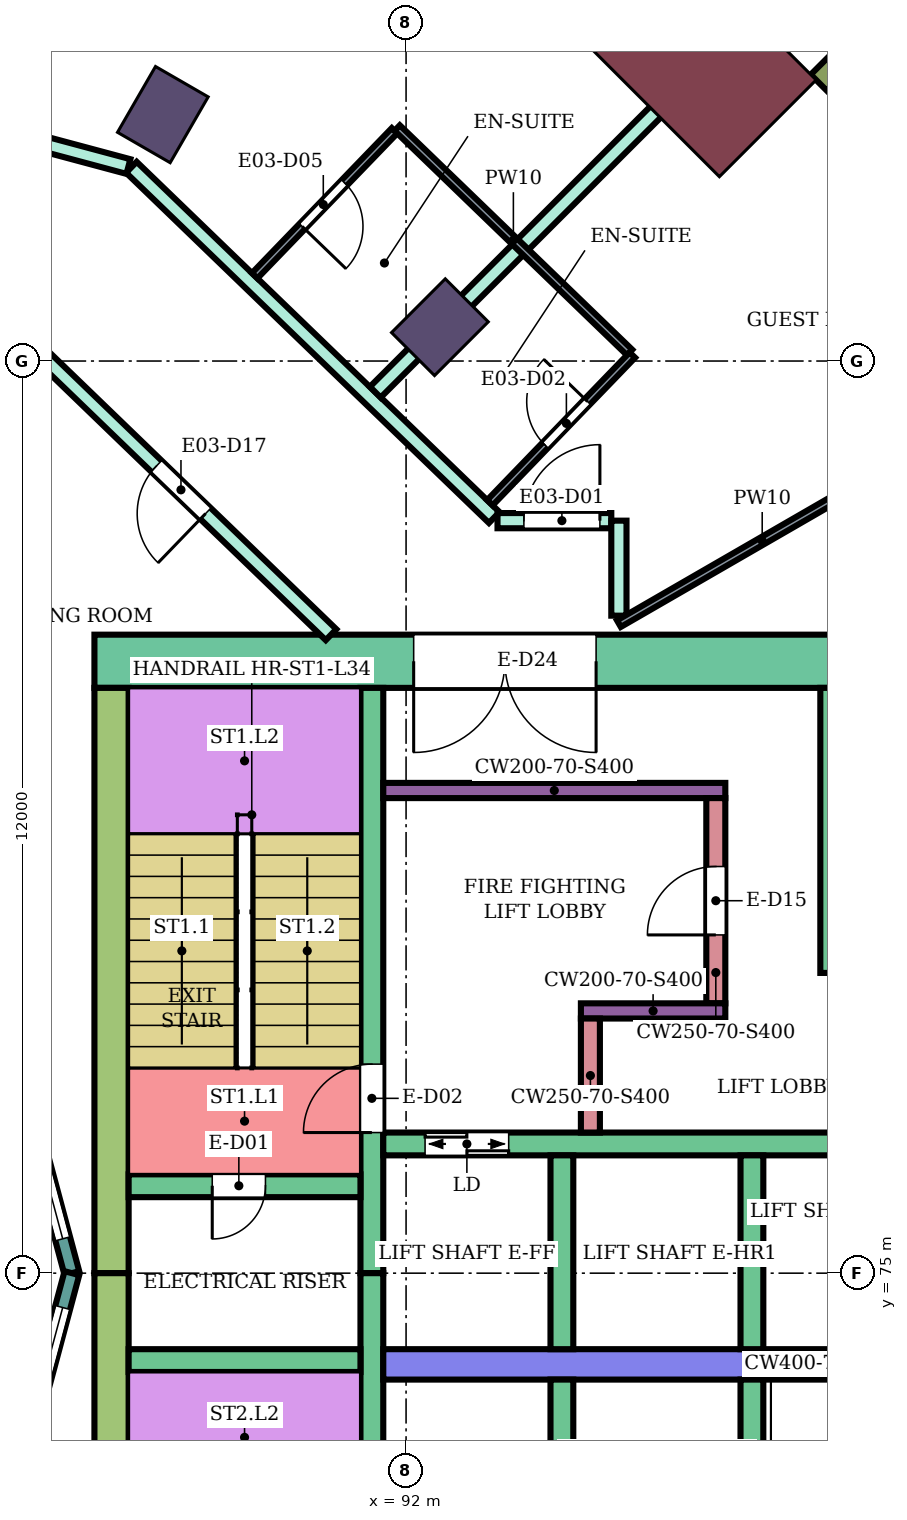
"""IFC4 building model, lengths in metres.
Left out: names, types, materials, properties, quantities, classifications, styles, units other than length and angle.
Written with IfcOpenShell. Run it as: python <this file> out.ifc"""

import sys

from ifc_helpers import new_model, si_unit, direction, frame, frame_2d, origin, origin_2d, place, context, subcontext, project, spatial, rectangle, extrude, element, fill, save


model = new_model("IFC4")
c1 = context("Model", 3, precision=1e-05, world=origin(), true_north=direction((0.0, 1.0)))
c2 = subcontext(c1, "Body", "Model", "MODEL_VIEW")
j1 = project(units=[si_unit("LENGTHUNIT", "METRE"), si_unit("PLANEANGLEUNIT", "RADIAN")], contexts=[c1])
p1 = place(None, origin())
s1 = spatial("IfcSite", under=j1, at=p1, CompositionType="ELEMENT")
p2 = place(p1, origin())
s2 = spatial("IfcBuilding", under=s1, at=p2, CompositionType="ELEMENT")
p3 = place(p2, frame((0.0, 0.0, 145.8)))
s3 = spatial("IfcBuildingStorey", under=s2, at=p3, CompositionType="ELEMENT", Elevation=145.8)
for number, where, z_axis, x_axis in (
    (1, (92.445, 87.445, 0.0), (0.0, 0.0, 1.0), (0.707, 0.707, 0.0)),
    (2, (88.8, 90.242, 0.0), (0.0, 0.0, 1.0), (0.5, 0.866, 0.0)),
):
    element("IfcColumn", number, at=place(p3, frame(where, z_axis=z_axis, x_axis=x_axis)), inside=s3, PredefinedType="COLUMN", context=c2, shape_type="SweptSolid", body=[
        extrude(rectangle(XDim=1.0, YDim=0.8, at=origin_2d()), origin(), (0.0, 0.0, 1.0), 3.9),
    ])
p4 = place(p3, frame((95.91, 90.91, 0.0), z_axis=(0.0, 0.0, 1.0), x_axis=(0.707106781187, 0.707106781187, 0.0)))
e3 = element("IfcColumn", 3, at=p4, inside=s3, PredefinedType="COLUMN", context=c2, shape_type="SweptSolid", body=[
    extrude(rectangle(XDim=1.8, YDim=2.4, at=origin_2d()), origin(), (0.0, 0.0, 1.0), 3.9),
])
p5 = place(p3, frame((87.9, 83.05, 0.0), z_axis=(0.0, 0.0, 1.0), x_axis=(1.0, 0.0, 0.0)))
e4 = element("IfcWall", 4, at=p5, inside=s3, PredefinedType="SHEAR", context=c2, shape_type="SweptSolid", body=[
    extrude(rectangle(XDim=14.8, YDim=0.7, at=frame_2d((7.4, 0.0))), origin(), (0.0, 0.0, 1.0), 3.5),
])
p6 = place(p5, frame((4.2, 0.0, 0.0)))
e5 = element("IfcOpeningElement", 5, at=p6, cuts=e4, PredefinedType="OPENING", context=c2, shape_type="SweptSolid", body=[
    extrude(rectangle(XDim=2.4, YDim=2.4, at=frame_2d((1.2, 1.2))), frame((0.0, 0.36, 0.0), z_axis=(0.0, -1.0, 0.0), x_axis=(1.0, 0.0, 0.0)), (0.0, 0.0, 1.0), 0.72),
])
for number, where, z_axis, x_axis in (
    (6, (88.125, 75.0, 0.0), (0.0, 0.0, 1.0), (0.0, 1.0, 0.0)),
    (7, (88.125, 67.3, 0.0), (0.0, 0.0, 1.0), (0.0, 1.0, 0.0)),
):
    element("IfcWall", number, at=place(p3, frame(where, z_axis=z_axis, x_axis=x_axis)), inside=s3, PredefinedType="SHEAR", context=c2, shape_type="SweptSolid", body=[
        extrude(rectangle(XDim=7.7, YDim=0.45, at=frame_2d((3.85, 0.0))), origin(), (0.0, 0.0, 1.0), 3.5),
    ])
p7 = place(p3, frame((91.55, 75.0, 0.0), z_axis=(0.0, 0.0, 1.0), x_axis=(0.0, 1.0, 0.0)))
e8 = element("IfcWall", 8, at=p7, inside=s3, PredefinedType="SHEAR", context=c2, shape_type="SweptSolid", body=[
    extrude(rectangle(XDim=7.7, YDim=0.3, at=frame_2d((3.85, 0.0))), origin(), (0.0, 0.0, 1.0), 3.5),
])
p8 = place(p7, frame((1.85, 0.0, 0.0)))
e9 = element("IfcOpeningElement", 9, at=p8, cuts=e8, PredefinedType="OPENING", context=c2, shape_type="SweptSolid", body=[
    extrude(rectangle(XDim=0.9, YDim=2.1, at=frame_2d((0.45, 1.05))), frame((0.0, 0.16, 0.0), z_axis=(0.0, -1.0, 0.0), x_axis=(1.0, 0.0, 0.0)), (0.0, 0.0, 1.0), 0.32),
])
p9 = place(p3, frame((91.55, 67.3, 0.0), z_axis=(0.0, 0.0, 1.0), x_axis=(0.0, 1.0, 0.0)))
e10 = element("IfcWall", 10, at=p9, inside=s3, PredefinedType="SHEAR", context=c2, shape_type="SweptSolid", body=[
    extrude(rectangle(XDim=7.7, YDim=0.3, at=frame_2d((3.85, 0.0))), origin(), (0.0, 0.0, 1.0), 3.5),
])
p10 = place(p9, frame((0.35, 0.0, 0.0)))
e11 = element("IfcOpeningElement", 11, at=p10, cuts=e10, PredefinedType="OPENING", context=c2, shape_type="SweptSolid", body=[
    extrude(rectangle(XDim=0.9, YDim=2.1, at=frame_2d((0.45, 1.05))), frame((0.0, 0.16, 0.0), z_axis=(0.0, -1.0, 0.0), x_axis=(1.0, 0.0, 0.0)), (0.0, 0.0, 1.0), 0.32),
])
p11 = place(p3, frame((88.35, 76.15, 0.0), z_axis=(0.0, 0.0, 1.0), x_axis=(1.0, 0.0, 0.0)))
e12 = element("IfcWall", 12, at=p11, inside=s3, PredefinedType="SHEAR", context=c2, shape_type="SweptSolid", body=[
    extrude(rectangle(XDim=3.05, YDim=0.3, at=frame_2d((1.525, 0.0))), origin(), (0.0, 0.0, 1.0), 3.5),
])
p12 = place(p11, frame((1.1, 0.0, 0.0)))
e13 = element("IfcOpeningElement", 13, at=p12, cuts=e12, PredefinedType="OPENING", context=c2, shape_type="SweptSolid", body=[
    extrude(rectangle(XDim=0.7, YDim=2.0, at=frame_2d((0.35, 1.0))), frame((0.0, 0.16, 0.0), z_axis=(0.0, -1.0, 0.0), x_axis=(1.0, 0.0, 0.0)), (0.0, 0.0, 1.0), 0.32),
])
p13 = place(p3, frame((88.35, 73.85, 0.0), z_axis=(0.0, 0.0, 1.0), x_axis=(1.0, 0.0, 0.0)))
e14 = element("IfcWall", 14, at=p13, inside=s3, PredefinedType="SHEAR", context=c2, shape_type="SweptSolid", body=[
    extrude(rectangle(XDim=3.05, YDim=0.3, at=frame_2d((1.525, 0.0))), origin(), (0.0, 0.0, 1.0), 3.5),
])
p14 = place(p3, frame((91.7, 76.7, 0.0), z_axis=(0.0, 0.0, 1.0), x_axis=(1.0, 0.0, 0.0)))
e15 = element("IfcWall", 15, at=p14, inside=s3, PredefinedType="SHEAR", context=c2, shape_type="SweptSolid", body=[
    extrude(rectangle(XDim=11.0, YDim=0.3, at=frame_2d((5.5, 0.0))), origin(), (0.0, 0.0, 1.0), 3.5),
])
p15 = place(p14, frame((0.55, 0.0, 0.0)))
e16 = element("IfcOpeningElement", 16, at=p15, cuts=e15, PredefinedType="OPENING", context=c2, shape_type="SweptSolid", body=[
    extrude(rectangle(XDim=1.1, YDim=2.1, at=frame_2d((0.55, 1.05))), frame((0.0, 0.16, 0.0), z_axis=(0.0, -1.0, 0.0), x_axis=(1.0, 0.0, 0.0)), (0.0, 0.0, 1.0), 0.32),
])
p16 = place(p14, frame((8.1, 0.0, 0.0)))
e17 = element("IfcOpeningElement", 17, at=p16, cuts=e15, PredefinedType="OPENING", context=c2, shape_type="SweptSolid", body=[
    extrude(rectangle(XDim=1.0, YDim=2.1, at=frame_2d((0.5, 1.05))), frame((0.0, 0.16, 0.0), z_axis=(0.0, -1.0, 0.0), x_axis=(1.0, 0.0, 0.0)), (0.0, 0.0, 1.0), 0.32),
])
p17 = place(p3, frame((91.7, 73.8, 0.0), z_axis=(0.0, 0.0, 1.0), x_axis=(1.0, 0.0, 0.0)))
e18 = element("IfcWall", 18, at=p17, inside=s3, PredefinedType="SHEAR", context=c2, shape_type="SweptSolid", body=[
    extrude(rectangle(XDim=11.0, YDim=0.4, at=frame_2d((5.5, 0.0))), origin(), (0.0, 0.0, 1.0), 3.5),
])
for number, where, z_axis, x_axis in (
    (19, (94.05, 74.0, 0.0), (0.0, 0.0, 1.0), (0.0, 1.0, 0.0)),
    (20, (96.55, 74.0, 0.0), (0.0, 0.0, 1.0), (0.0, 1.0, 0.0)),
    (21, (94.05, 71.05, 0.0), (0.0, 0.0, 1.0), (0.0, 1.0, 0.0)),
    (22, (96.55, 71.05, 0.0), (0.0, 0.0, 1.0), (0.0, 1.0, 0.0)),
):
    element("IfcWall", number, at=place(p3, frame(where, z_axis=z_axis, x_axis=x_axis)), inside=s3, PredefinedType="SHEAR", context=c2, shape_type="SweptSolid", body=[
        extrude(rectangle(XDim=2.55, YDim=0.3, at=frame_2d((1.275, 0.0))), origin(), (0.0, 0.0, 1.0), 3.5),
    ])
p18 = place(p3, frame((91.7, 81.35, 0.0), z_axis=(0.0, 0.0, 1.0), x_axis=(1.0, 0.0, 0.0)))
e23 = element("IfcWall", 23, at=p18, inside=s3, PredefinedType="SHEAR", context=c2, shape_type="SweptSolid", body=[
    extrude(rectangle(XDim=4.5, YDim=0.2, at=frame_2d((2.25, 0.0))), origin(), (0.0, 0.0, 1.0), 3.5),
])
p19 = place(p3, frame((96.075, 78.55, 0.0), z_axis=(0.0, 0.0, 1.0), x_axis=(0.0, 1.0, 0.0)))
e24 = element("IfcWall", 24, at=p19, inside=s3, PredefinedType="SHEAR", context=c2, shape_type="SweptSolid", body=[
    extrude(rectangle(XDim=2.7, YDim=0.25, at=frame_2d((1.35, 0.0))), origin(), (0.0, 0.0, 1.0), 3.5),
])
p20 = place(p19, frame((0.9, 0.0, 0.0)))
e25 = element("IfcOpeningElement", 25, at=p20, cuts=e24, PredefinedType="OPENING", context=c2, shape_type="SweptSolid", body=[
    extrude(rectangle(XDim=0.9, YDim=2.1, at=frame_2d((0.45, 1.05))), frame((0.0, 0.135, 0.0), z_axis=(0.0, -1.0, 0.0), x_axis=(1.0, 0.0, 0.0)), (0.0, 0.0, 1.0), 0.27),
])
p21 = place(p3, frame((94.3, 78.45, 0.0), z_axis=(0.0, 0.0, 1.0), x_axis=(1.0, 0.0, 0.0)))
e26 = element("IfcWall", 26, at=p21, inside=s3, PredefinedType="SHEAR", context=c2, shape_type="SweptSolid", body=[
    extrude(rectangle(XDim=1.9, YDim=0.2, at=frame_2d((0.95, 0.0))), origin(), (0.0, 0.0, 1.0), 3.5),
])
p22 = place(p3, frame((94.425, 76.85, 0.0), z_axis=(0.0, 0.0, 1.0), x_axis=(0.0, 1.0, 0.0)))
e27 = element("IfcWall", 27, at=p22, inside=s3, PredefinedType="SHEAR", context=c2, shape_type="SweptSolid", body=[
    extrude(rectangle(XDim=1.5, YDim=0.25, at=frame_2d((0.75, 0.0))), origin(), (0.0, 0.0, 1.0), 3.5),
])
p23 = place(p3, frame((97.6, 78.95, 0.0), z_axis=(0.0, 0.0, 1.0), x_axis=(0.0, 1.0, 0.0)))
e28 = element("IfcWall", 28, at=p23, inside=s3, PredefinedType="SHEAR", context=c2, shape_type="SweptSolid", body=[
    extrude(rectangle(XDim=3.75, YDim=0.3, at=frame_2d((1.875, 0.0))), origin(), (0.0, 0.0, 1.0), 3.5),
])
p24 = place(p3, frame((97.43, 90.662, 0.0), z_axis=(0.0, 0.0, 1.0), x_axis=(0.707106781187, 0.707106781187, 0.0)))
e29 = element("IfcWall", 29, at=p24, inside=s3, PredefinedType="NOTDEFINED", context=c2, shape_type="SweptSolid", body=[
    extrude(rectangle(XDim=2.416, YDim=0.3, at=frame_2d((1.208, 0.0))), origin(), (0.0, 0.0, 1.0), 3.9),
])
p25 = place(p3, frame((87.604, 75.0, 0.0), z_axis=(0.0, 0.0, 1.0), x_axis=(-0.258789828301, 0.965933654434, 0.0)))
e30 = element("IfcWall", 30, at=p25, inside=s3, PredefinedType="NOTDEFINED", context=c2, shape_type="SweptSolid", body=[
    extrude(rectangle(XDim=3.936, YDim=0.2, at=frame_2d((1.968, 0.0))), origin(), (0.0, 0.0, 1.0), 3.9),
])
p26 = place(p25, frame((0.468, 0.0, 0.9)))
e31 = element("IfcOpeningElement", 31, at=p26, cuts=e30, PredefinedType="OPENING", context=c2, shape_type="SweptSolid", body=[
    extrude(rectangle(XDim=3.0, YDim=2.3, at=frame_2d((1.5, 1.15))), frame((0.0, 0.11, 0.0), z_axis=(0.0, -1.0, 0.0), x_axis=(1.0, 0.0, 0.0)), (0.0, 0.0, 1.0), 0.22),
])
p27 = place(p3, frame((86.585, 71.198, 0.0), z_axis=(0.0, 0.0, 1.0), x_axis=(0.258789828301, 0.965933654434, 0.0)))
e32 = element("IfcWall", 32, at=p27, inside=s3, PredefinedType="NOTDEFINED", context=c2, shape_type="SweptSolid", body=[
    extrude(rectangle(XDim=3.936, YDim=0.2, at=frame_2d((1.968, 0.0))), origin(), (0.0, 0.0, 1.0), 3.9),
])
p28 = place(p27, frame((0.468, 0.0, 0.9)))
e33 = element("IfcOpeningElement", 33, at=p28, cuts=e32, PredefinedType="OPENING", context=c2, shape_type="SweptSolid", body=[
    extrude(rectangle(XDim=3.0, YDim=2.3, at=frame_2d((1.5, 1.15))), frame((0.0, 0.11, 0.0), z_axis=(0.0, -1.0, 0.0), x_axis=(1.0, 0.0, 0.0)), (0.0, 0.0, 1.0), 0.22),
])
p29 = place(p3, frame((80.0, 91.796, 0.0), z_axis=(0.0, 0.0, 1.0), x_axis=(0.965891796243, -0.258946013582, 0.0)))
e34 = element("IfcWall", 34, at=p29, inside=s3, PredefinedType="PARTITIONING", context=c2, shape_type="SweptSolid", body=[
    extrude(rectangle(XDim=8.642, YDim=0.2, at=frame_2d((4.321, 0.0))), origin(), (0.0, 0.0, 1.0), 3.45),
])
p30 = place(p29, frame((4.877, 0.0, 0.0)))
e35 = element("IfcOpeningElement", 35, at=p30, cuts=e34, PredefinedType="OPENING", context=c2, shape_type="SweptSolid", body=[
    extrude(rectangle(XDim=1.0, YDim=2.1, at=frame_2d((0.5, 1.05))), frame((0.0, 0.11, 0.0), z_axis=(0.0, -1.0, 0.0), x_axis=(1.0, 0.0, 0.0)), (0.0, 0.0, 1.0), 0.22),
])
p31 = place(p29, frame((2.817, 0.0, 0.0)))
e36 = element("IfcOpeningElement", 36, at=p31, cuts=e34, PredefinedType="OPENING", context=c2, shape_type="SweptSolid", body=[
    extrude(rectangle(XDim=1.0, YDim=2.1, at=frame_2d((0.5, 1.05))), frame((0.0, 0.11, 0.0), z_axis=(0.0, -1.0, 0.0), x_axis=(1.0, 0.0, 0.0)), (0.0, 0.0, 1.0), 0.22),
])
p32 = place(p3, frame((87.064, 87.211, 0.0), z_axis=(0.0, 0.0, 1.0), x_axis=(0.719562412484, -0.694427774891, 0.0)))
e37 = element("IfcWall", 37, at=p32, inside=s3, PredefinedType="PARTITIONING", context=c2, shape_type="SweptSolid", body=[
    extrude(rectangle(XDim=5.488, YDim=0.2, at=frame_2d((2.744, 0.0))), origin(), (0.0, 0.0, 1.0), 3.45),
])
p33 = place(p32, frame((2.294, 0.0, 0.0)))
e38 = element("IfcOpeningElement", 38, at=p33, cuts=e37, PredefinedType="OPENING", context=c2, shape_type="SweptSolid", body=[
    extrude(rectangle(XDim=0.9, YDim=2.1, at=frame_2d((0.45, 1.05))), frame((0.0, 0.11, 0.0), z_axis=(0.0, -1.0, 0.0), x_axis=(1.0, 0.0, 0.0)), (0.0, 0.0, 1.0), 0.22),
])
p34 = place(p3, frame((88.386, 89.549, 0.0), z_axis=(0.0, 0.0, 1.0), x_axis=(0.719507339337, -0.694484836869, 0.0)))
e39 = element("IfcWall", 39, at=p34, inside=s3, PredefinedType="PARTITIONING", context=c2, shape_type="SweptSolid", body=[
    extrude(rectangle(XDim=6.635, YDim=0.2, at=frame_2d((3.317, 0.0))), origin(), (0.0, 0.0, 1.0), 3.45),
])
p35 = place(p3, frame((91.595, 86.591, 0.0), z_axis=(0.0, 0.0, 1.0), x_axis=(0.707214399597, 0.706999146394, 0.0)))
e40 = element("IfcWall", 40, at=p35, inside=s3, PredefinedType="PARTITIONING", context=c2, shape_type="SweptSolid", body=[
    extrude(rectangle(XDim=6.805, YDim=0.2, at=frame_2d((3.403, 0.0))), origin(), (0.0, 0.0, 1.0), 3.45),
])
p36 = place(p3, frame((93.203, 84.9, 0.0), z_axis=(0.0, 0.0, 1.0), x_axis=(1.0, 0.0, 0.0)))
e41 = element("IfcWall", 41, at=p36, inside=s3, PredefinedType="PARTITIONING", context=c2, shape_type="SweptSolid", body=[
    extrude(rectangle(XDim=1.497, YDim=0.2, at=frame_2d((0.749, 0.0))), origin(), (0.0, 0.0, 1.0), 3.45),
])
p37 = place(p36, frame((0.347, 0.0, 0.0)))
e42 = element("IfcOpeningElement", 42, at=p37, cuts=e41, PredefinedType="OPENING", context=c2, shape_type="SweptSolid", body=[
    extrude(rectangle(XDim=1.0, YDim=2.1, at=frame_2d((0.5, 1.05))), frame((0.0, 0.11, 0.0), z_axis=(0.0, -1.0, 0.0), x_axis=(1.0, 0.0, 0.0)), (0.0, 0.0, 1.0), 0.22),
])
p38 = place(p3, frame((94.8, 83.65, 0.0), z_axis=(0.0, 0.0, 1.0), x_axis=(0.0, 1.0, 0.0)))
e43 = element("IfcWall", 43, at=p38, inside=s3, PredefinedType="PARTITIONING", context=c2, shape_type="SweptSolid", body=[
    extrude(rectangle(XDim=1.25, YDim=0.2, at=frame_2d((0.625, 0.0))), origin(), (0.0, 0.0, 1.0), 3.45),
])
p39 = place(p3, frame((90.008, 88.123, 0.0), z_axis=(0.0, 0.0, 1.0), x_axis=(0.694372521817, 0.719615731447, 0.0)))
e44 = element("IfcWall", 44, at=p39, inside=s3, PredefinedType="PARTITIONING", context=c2, shape_type="SweptSolid", body=[
    extrude(rectangle(XDim=2.65, YDim=0.1, at=frame_2d((1.325, 0.0))), origin(), (0.0, 0.0, 1.0), 3.45),
])
p40 = place(p39, frame((0.9, 0.0, 0.0)))
e45 = element("IfcOpeningElement", 45, at=p40, cuts=e44, PredefinedType="OPENING", context=c2, shape_type="SweptSolid", body=[
    extrude(rectangle(XDim=0.8, YDim=2.1, at=frame_2d((0.4, 1.05))), frame((0.0, 0.06, 0.0), z_axis=(0.0, -1.0, 0.0), x_axis=(1.0, 0.0, 0.0)), (0.0, 0.0, 1.0), 0.12),
])
p41 = place(p3, frame((91.883, 90.066, 0.0), z_axis=(0.0, 0.0, 1.0), x_axis=(0.719460839421, -0.694533008963, 0.0)))
e46 = element("IfcWall", 46, at=p41, inside=s3, PredefinedType="PARTITIONING", context=c2, shape_type="SweptSolid", body=[
    extrude(rectangle(XDim=4.25, YDim=0.1, at=frame_2d((2.125, 0.0))), origin(), (0.0, 0.0, 1.0), 3.45),
])
p42 = place(p3, frame((93.103, 85.136, 0.0), z_axis=(0.0, 0.0, 1.0), x_axis=(0.694287838235, 0.719697434815, 0.0)))
e47 = element("IfcWall", 47, at=p42, inside=s3, PredefinedType="PARTITIONING", context=c2, shape_type="SweptSolid", body=[
    extrude(rectangle(XDim=2.7, YDim=0.1, at=frame_2d((1.35, 0.0))), origin(), (0.0, 0.0, 1.0), 3.45),
])
p43 = place(p42, frame((1.05, 0.0, 0.0)))
e48 = element("IfcOpeningElement", 48, at=p43, cuts=e47, PredefinedType="OPENING", context=c2, shape_type="SweptSolid", body=[
    extrude(rectangle(XDim=0.8, YDim=2.1, at=frame_2d((0.4, 1.05))), frame((0.0, 0.06, 0.0), z_axis=(0.0, -1.0, 0.0), x_axis=(1.0, 0.0, 0.0)), (0.0, 0.0, 1.0), 0.12),
])
p44 = place(p3, frame((94.8, 83.545, 0.0), z_axis=(0.0, 0.0, 1.0), x_axis=(0.86602264145, 0.500004784474, 0.0)))
e49 = element("IfcWall", 49, at=p44, inside=s3, PredefinedType="PARTITIONING", context=c2, shape_type="SweptSolid", body=[
    extrude(rectangle(XDim=8.708, YDim=0.1, at=frame_2d((4.354, 0.0))), origin(), (0.0, 0.0, 1.0), 3.45),
])
p45 = place(p44, frame((3.879, 0.0, 0.0)))
e50 = element("IfcOpeningElement", 50, at=p45, cuts=e49, PredefinedType="OPENING", context=c2, shape_type="SweptSolid", body=[
    extrude(rectangle(XDim=0.9, YDim=2.1, at=frame_2d((0.45, 1.05))), frame((0.0, 0.06, 0.0), z_axis=(0.0, -1.0, 0.0), x_axis=(1.0, 0.0, 0.0)), (0.0, 0.0, 1.0), 0.12),
])
p46 = place(p26, origin())
e51 = element("IfcWindow", 51, at=p46, inside=s3, PartitioningType="SINGLE_PANEL", PredefinedType="WINDOW", context=c2, shape_type="SweptSolid", body=[
    extrude(rectangle(XDim=3.0, YDim=2.3, at=frame_2d((1.5, 1.15))), frame((0.0, 0.03, 0.0), z_axis=(0.0, -1.0, 0.0), x_axis=(1.0, 0.0, 0.0)), (0.0, 0.0, 1.0), 0.06),
])
fill(e31, e51)
p47 = place(p28, origin())
e52 = element("IfcWindow", 52, at=p47, inside=s3, PartitioningType="SINGLE_PANEL", PredefinedType="WINDOW", context=c2, shape_type="SweptSolid", body=[
    extrude(rectangle(XDim=3.0, YDim=2.3, at=frame_2d((1.5, 1.15))), frame((0.0, 0.03, 0.0), z_axis=(0.0, -1.0, 0.0), x_axis=(1.0, 0.0, 0.0)), (0.0, 0.0, 1.0), 0.06),
])
fill(e33, e52)
p48 = place(p37, origin())
e53 = element("IfcDoor", 53, at=p48, inside=s3, OperationType="SINGLE_SWING_RIGHT", PredefinedType="DOOR", context=c2, shape_type="SweptSolid", body=[
    extrude(rectangle(XDim=1.0, YDim=2.1, at=frame_2d((0.5, 1.05))), frame((0.0, 0.025, 0.0), z_axis=(0.0, -1.0, 0.0), x_axis=(1.0, 0.0, 0.0)), (0.0, 0.0, 1.0), 0.05),
])
fill(e42, e53)
p49 = place(p43, origin())
e54 = element("IfcDoor", 54, at=p49, inside=s3, OperationType="SINGLE_SWING_RIGHT", PredefinedType="DOOR", context=c2, shape_type="SweptSolid", body=[
    extrude(rectangle(XDim=0.8, YDim=2.1, at=frame_2d((0.4, 1.05))), frame((0.0, 0.025, 0.0), z_axis=(0.0, -1.0, 0.0), x_axis=(1.0, 0.0, 0.0)), (0.0, 0.0, 1.0), 0.05),
])
fill(e48, e54)
p50 = place(p40, frame((0.8, 0.0, 0.0), z_axis=(0.0, 0.0, 1.0), x_axis=(-1.0, 0.0, 0.0)))
e55 = element("IfcDoor", 55, at=p50, inside=s3, OperationType="SINGLE_SWING_RIGHT", PredefinedType="DOOR", context=c2, shape_type="SweptSolid", body=[
    extrude(rectangle(XDim=0.8, YDim=2.1, at=frame_2d((0.4, 1.05))), frame((0.0, 0.025, 0.0), z_axis=(0.0, -1.0, 0.0), x_axis=(1.0, 0.0, 0.0)), (0.0, 0.0, 1.0), 0.05),
])
fill(e45, e55)
p51 = place(p33, frame((0.9, 0.0, 0.0), z_axis=(0.0, 0.0, 1.0), x_axis=(-1.0, 0.0, 0.0)))
e56 = element("IfcDoor", 56, at=p51, inside=s3, OperationType="SINGLE_SWING_LEFT", PredefinedType="DOOR", context=c2, shape_type="SweptSolid", body=[
    extrude(rectangle(XDim=0.9, YDim=2.1, at=frame_2d((0.45, 1.05))), frame((0.0, 0.025, 0.0), z_axis=(0.0, -1.0, 0.0), x_axis=(1.0, 0.0, 0.0)), (0.0, 0.0, 1.0), 0.05),
])
fill(e38, e56)
p52 = place(p12, frame((0.7, 0.0, 0.0), z_axis=(0.0, 0.0, 1.0), x_axis=(-1.0, 0.0, 0.0)))
e57 = element("IfcDoor", 57, at=p52, inside=s3, OperationType="SINGLE_SWING_RIGHT", PredefinedType="DOOR", context=c2, shape_type="SweptSolid", body=[
    extrude(rectangle(XDim=0.7, YDim=2.0, at=frame_2d((0.35, 1.0))), frame((0.0, 0.025, 0.0), z_axis=(0.0, -1.0, 0.0), x_axis=(1.0, 0.0, 0.0)), (0.0, 0.0, 1.0), 0.05),
])
fill(e13, e57)
p53 = place(p8, origin())
e58 = element("IfcDoor", 58, at=p53, inside=s3, OperationType="SINGLE_SWING_LEFT", PredefinedType="DOOR", context=c2, shape_type="SweptSolid", body=[
    extrude(rectangle(XDim=0.9, YDim=2.1, at=frame_2d((0.45, 1.05))), frame((0.0, 0.025, 0.0), z_axis=(0.0, -1.0, 0.0), x_axis=(1.0, 0.0, 0.0)), (0.0, 0.0, 1.0), 0.05),
])
fill(e9, e58)
p54 = place(p15, origin())
e59 = element("IfcDoor", 59, at=p54, inside=s3, OperationType="DOUBLE_DOOR_SLIDING", PredefinedType="DOOR", context=c2, shape_type="SweptSolid", body=[
    extrude(rectangle(XDim=1.1, YDim=2.1, at=frame_2d((0.55, 1.05))), frame((0.0, 0.025, 0.0), z_axis=(0.0, -1.0, 0.0), x_axis=(1.0, 0.0, 0.0)), (0.0, 0.0, 1.0), 0.05),
])
fill(e16, e59)
p55 = place(p20, origin())
e60 = element("IfcDoor", 60, at=p55, inside=s3, OperationType="SINGLE_SWING_LEFT", PredefinedType="DOOR", context=c2, shape_type="SweptSolid", body=[
    extrude(rectangle(XDim=0.9, YDim=2.1, at=frame_2d((0.45, 1.05))), frame((0.0, 0.025, 0.0), z_axis=(0.0, -1.0, 0.0), x_axis=(1.0, 0.0, 0.0)), (0.0, 0.0, 1.0), 0.05),
])
fill(e25, e60)
p56 = place(p6, frame((2.4, 0.0, 0.0), z_axis=(0.0, 0.0, 1.0), x_axis=(-1.0, 0.0, 0.0)))
e61 = element("IfcDoor", 61, at=p56, inside=s3, OperationType="DOUBLE_DOOR_SINGLE_SWING", PredefinedType="DOOR", context=c2, shape_type="SweptSolid", body=[
    extrude(rectangle(XDim=2.4, YDim=2.4, at=frame_2d((1.2, 1.2))), frame((0.0, 0.025, 0.0), z_axis=(0.0, -1.0, 0.0), x_axis=(1.0, 0.0, 0.0)), (0.0, 0.0, 1.0), 0.05),
])
fill(e5, e61)
save(model, sys.argv[1])
